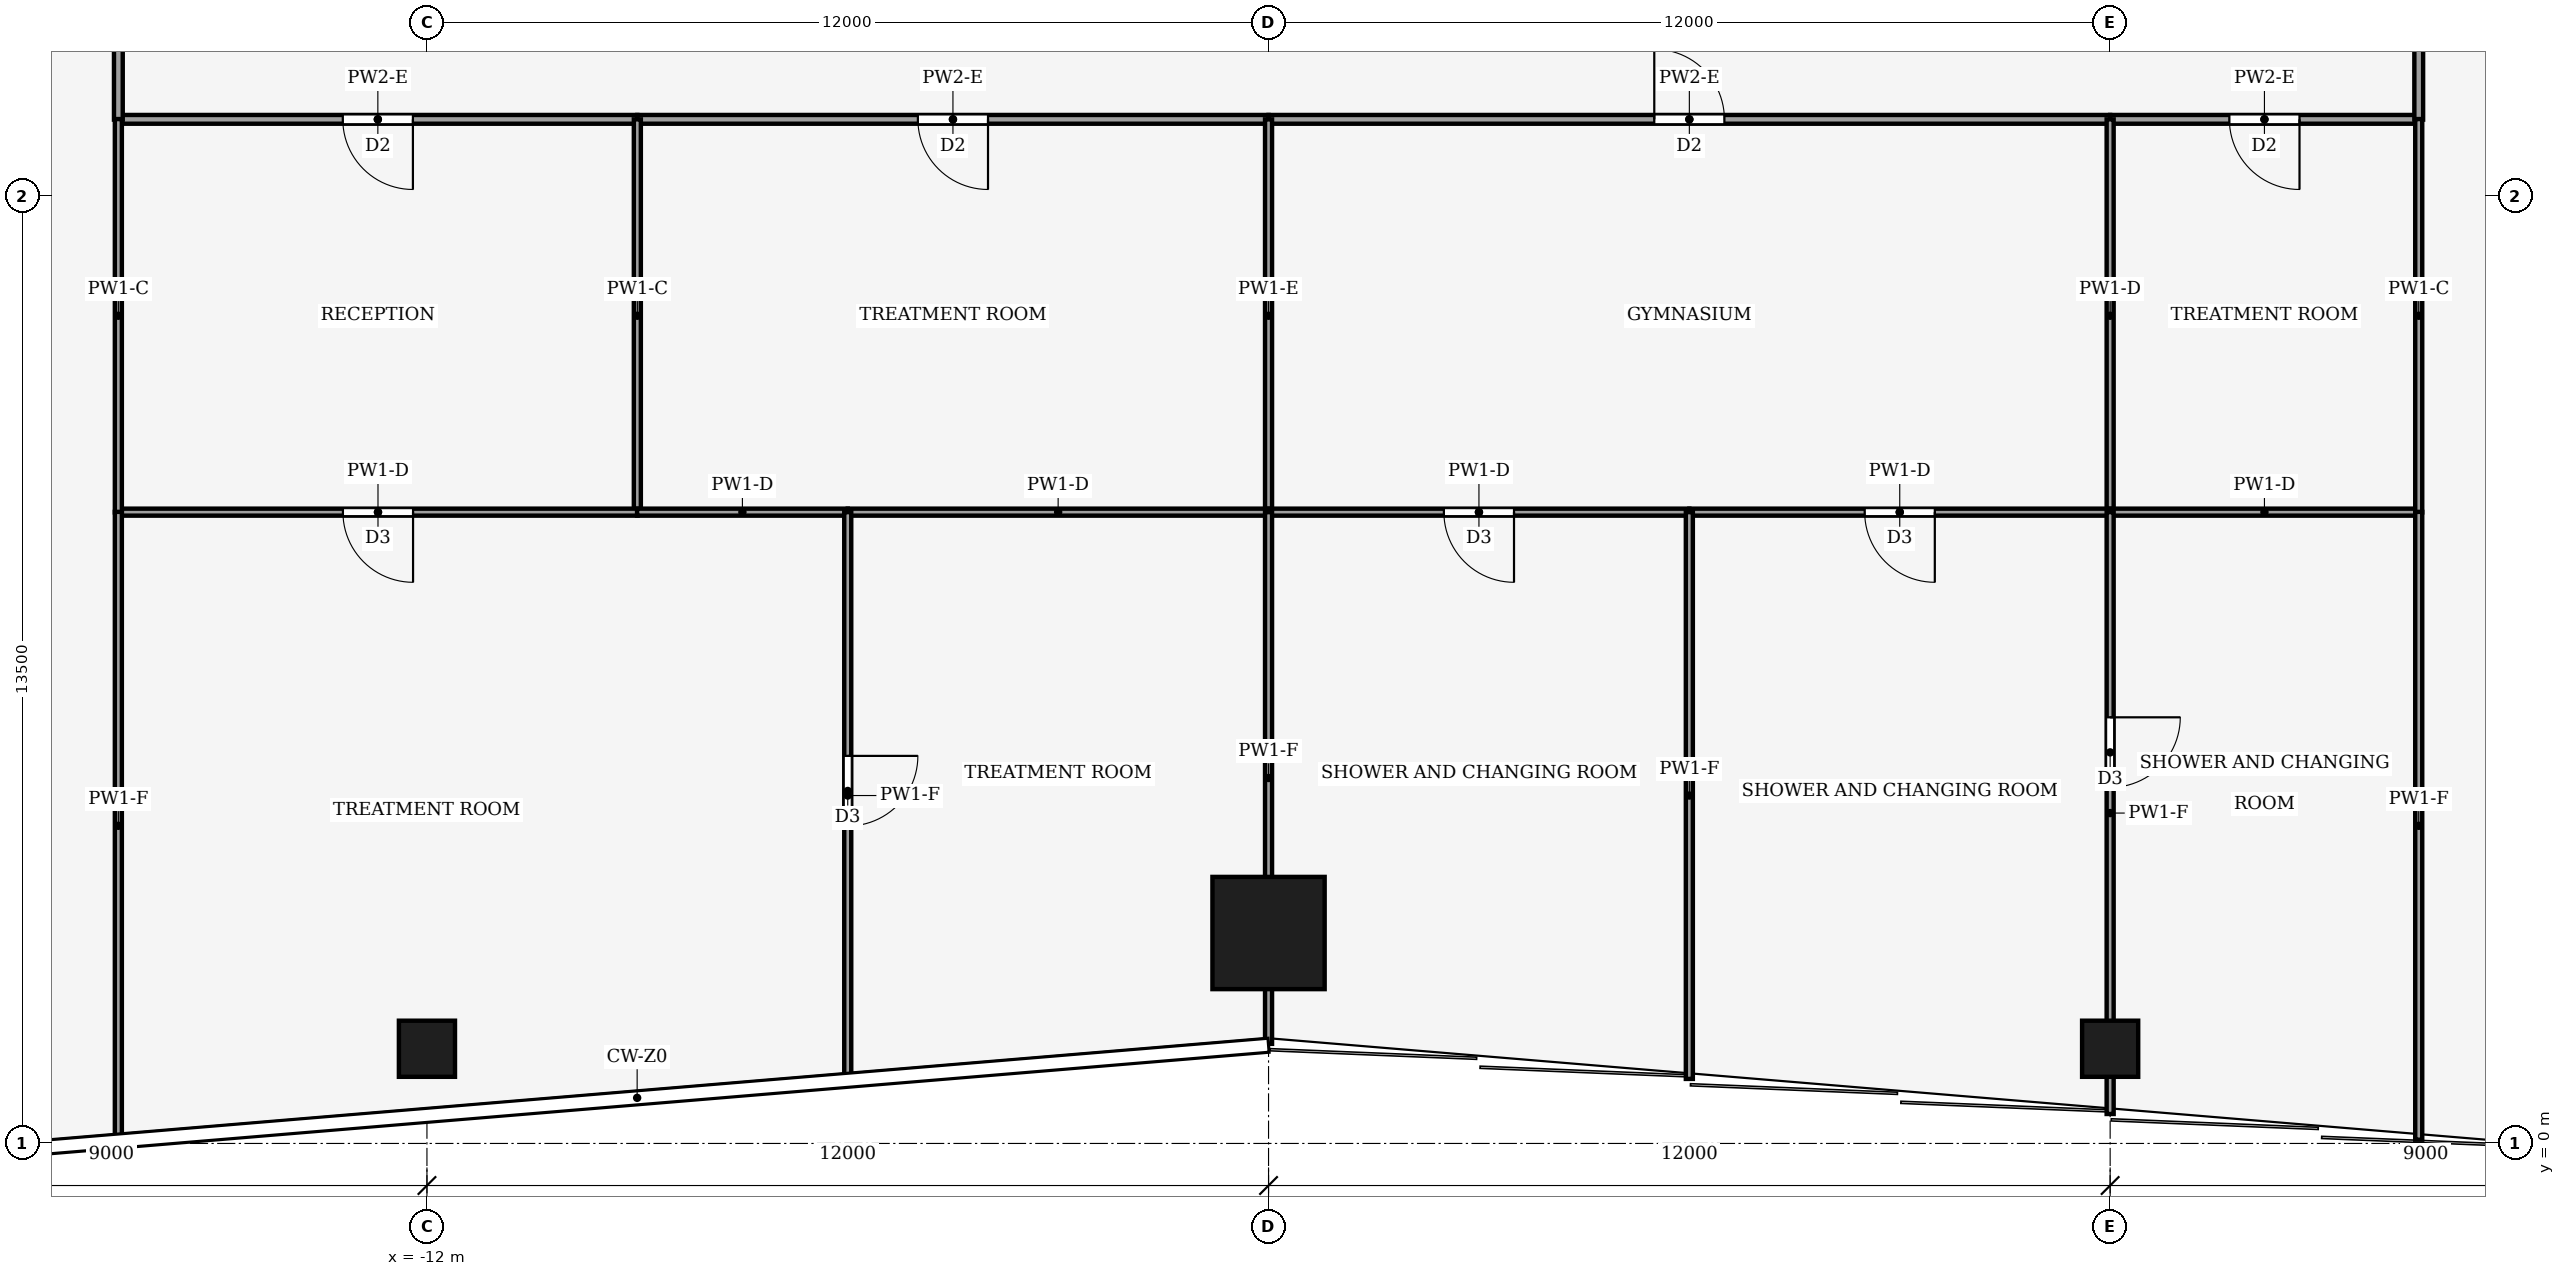
"""IFC4 building model, lengths in metres.
Left out: names, types, materials, properties, quantities, classifications, styles, units other than length and angle.
Written with IfcOpenShell. Run it as: python <this file> out.ifc"""

import sys

from ifc_helpers import new_model, si_unit, direction, frame, frame_2d, origin, origin_2d, place, context, subcontext, project, spatial, rectangle, hollow_rectangle, extrude, element, fill, save


model = new_model("IFC4")
c1 = context("Model", 3, precision=1e-05, world=origin(), true_north=direction((0.0, 1.0)))
c2 = subcontext(c1, "Body", "Model", "MODEL_VIEW")
j1 = project(units=[si_unit("LENGTHUNIT", "METRE"), si_unit("PLANEANGLEUNIT", "RADIAN")], contexts=[c1])
p1 = place(None, origin())
s1 = spatial("IfcSite", under=j1, at=p1, CompositionType="ELEMENT")
p2 = place(p1, origin())
s2 = spatial("IfcBuilding", under=s1, at=p2, CompositionType="ELEMENT")
p3 = place(p2, frame((0.0, 0.0, 18.0)))
s3 = spatial("IfcBuildingStorey", under=s2, at=p3, CompositionType="ELEMENT", Elevation=18.0)
p4 = place(p3, frame((0.0, 3.0, 0.0), z_axis=(0.0, 0.0, 1.0), x_axis=(1.0, 0.0, 0.0)))
e1 = element("IfcColumn", 1, at=p4, inside=s3, PredefinedType="COLUMN", context=c2, shape_type="SweptSolid", body=[
    extrude(hollow_rectangle(XDim=1.6, YDim=1.6, WallThickness=0.09, at=origin_2d()), origin(), (0.0, 0.0, 1.0), 4.0),
])
for number, where, z_axis, x_axis in (
    (2, (-12.0, 1.35, 0.0), (0.0, 0.0, 1.0), (1.0, 0.0, 0.0)),
    (3, (12.0, 1.35, 0.0), (0.0, 0.0, 1.0), (1.0, 0.0, 0.0)),
):
    element("IfcColumn", number, at=place(p3, frame(where, z_axis=z_axis, x_axis=x_axis)), inside=s3, PredefinedType="COLUMN", context=c2, shape_type="SweptSolid", body=[
        extrude(hollow_rectangle(XDim=0.8, YDim=0.8, WallThickness=0.04, at=origin_2d()), origin(), (0.0, 0.0, 1.0), 4.0),
    ])
p5 = place(p3, frame((-9.0, 14.6, 0.0), z_axis=(0.0, 0.0, 1.0), x_axis=(-1.0, 0.0, 0.0)))
e4 = element("IfcWall", 4, at=p5, inside=s3, PredefinedType="PARTITIONING", context=c2, shape_type="SweptSolid", body=[
    extrude(rectangle(XDim=7.4, YDim=0.125, at=frame_2d((3.7, 0.0))), origin(), (0.0, 0.0, 1.0), 3.29),
])
p6 = place(p5, frame((3.2, 0.0, 0.0)))
e5 = element("IfcOpeningElement", 5, at=p6, cuts=e4, PredefinedType="OPENING", context=c2, shape_type="SweptSolid", body=[
    extrude(rectangle(XDim=1.0, YDim=2.1, at=frame_2d((0.5, 1.05))), frame((0.0, 0.073, 0.0), z_axis=(0.0, -1.0, 0.0), x_axis=(1.0, 0.0, 0.0)), (0.0, 0.0, 1.0), 0.145),
])
p7 = place(p3, frame((0.0, 14.6, 0.0), z_axis=(0.0, 0.0, 1.0), x_axis=(-1.0, 0.0, 0.0)))
e6 = element("IfcWall", 6, at=p7, inside=s3, PredefinedType="PARTITIONING", context=c2, shape_type="SweptSolid", body=[
    extrude(rectangle(XDim=9.0, YDim=0.125, at=frame_2d((4.5, 0.0))), origin(), (0.0, 0.0, 1.0), 3.29),
])
p8 = place(p7, frame((4.0, 0.0, 0.0)))
e7 = element("IfcOpeningElement", 7, at=p8, cuts=e6, PredefinedType="OPENING", context=c2, shape_type="SweptSolid", body=[
    extrude(rectangle(XDim=1.0, YDim=2.1, at=frame_2d((0.5, 1.05))), frame((0.0, 0.073, 0.0), z_axis=(0.0, -1.0, 0.0), x_axis=(1.0, 0.0, 0.0)), (0.0, 0.0, 1.0), 0.145),
])
p9 = place(p3, frame((0.0, 14.6, 0.0), z_axis=(0.0, 0.0, 1.0), x_axis=(1.0, 0.0, 0.0)))
e8 = element("IfcWall", 8, at=p9, inside=s3, PredefinedType="PARTITIONING", context=c2, shape_type="SweptSolid", body=[
    extrude(rectangle(XDim=12.0, YDim=0.125, at=frame_2d((6.0, 0.0))), origin(), (0.0, 0.0, 1.0), 3.29),
])
p10 = place(p9, frame((5.5, 0.0, 0.0)))
e9 = element("IfcOpeningElement", 9, at=p10, cuts=e8, PredefinedType="OPENING", context=c2, shape_type="SweptSolid", body=[
    extrude(rectangle(XDim=1.0, YDim=2.1, at=frame_2d((0.5, 1.05))), frame((0.0, 0.073, 0.0), z_axis=(0.0, -1.0, 0.0), x_axis=(1.0, 0.0, 0.0)), (0.0, 0.0, 1.0), 0.145),
])
p11 = place(p3, frame((16.4, 14.6, 0.0), z_axis=(0.0, 0.0, 1.0), x_axis=(-1.0, 0.0, 0.0)))
e10 = element("IfcWall", 10, at=p11, inside=s3, PredefinedType="PARTITIONING", context=c2, shape_type="SweptSolid", body=[
    extrude(rectangle(XDim=4.4, YDim=0.125, at=frame_2d((2.2, 0.0))), origin(), (0.0, 0.0, 1.0), 3.29),
])
p12 = place(p11, frame((1.7, 0.0, 0.0)))
e11 = element("IfcOpeningElement", 11, at=p12, cuts=e10, PredefinedType="OPENING", context=c2, shape_type="SweptSolid", body=[
    extrude(rectangle(XDim=1.0, YDim=2.1, at=frame_2d((0.5, 1.05))), frame((0.0, 0.073, 0.0), z_axis=(0.0, -1.0, 0.0), x_axis=(1.0, 0.0, 0.0)), (0.0, 0.0, 1.0), 0.145),
])
p13 = place(p3, frame((-16.4, 14.596, 0.0), z_axis=(0.0, 0.0, 1.0), x_axis=(0.0, 1.0, 0.0)))
e12 = element("IfcWall", 12, at=p13, inside=s3, PredefinedType="PARTITIONING", context=c2, shape_type="SweptSolid", body=[
    extrude(rectangle(XDim=6.404, YDim=0.125, at=frame_2d((3.202, 0.0))), origin(), (0.0, 0.0, 1.0), 3.14),
])
p14 = place(p13, frame((2.702, 0.0, 0.0)))
e13 = element("IfcOpeningElement", 13, at=p14, cuts=e12, PredefinedType="OPENING", context=c2, shape_type="SweptSolid", body=[
    extrude(rectangle(XDim=1.0, YDim=2.1, at=frame_2d((0.5, 1.05))), frame((0.0, 0.073, 0.0), z_axis=(0.0, -1.0, 0.0), x_axis=(1.0, 0.0, 0.0)), (0.0, 0.0, 1.0), 0.145),
])
p15 = place(p3, frame((16.4, 21.0, 0.0), z_axis=(0.0, 0.0, 1.0), x_axis=(0.0, -1.0, 0.0)))
e14 = element("IfcWall", 14, at=p15, inside=s3, PredefinedType="PARTITIONING", context=c2, shape_type="SweptSolid", body=[
    extrude(rectangle(XDim=6.404, YDim=0.125, at=frame_2d((3.202, 0.0))), origin(), (0.0, 0.0, 1.0), 3.14),
])
p16 = place(p15, frame((2.702, 0.0, 0.0)))
e15 = element("IfcOpeningElement", 15, at=p16, cuts=e14, PredefinedType="OPENING", context=c2, shape_type="SweptSolid", body=[
    extrude(rectangle(XDim=1.0, YDim=2.1, at=frame_2d((0.5, 1.05))), frame((0.0, 0.073, 0.0), z_axis=(0.0, -1.0, 0.0), x_axis=(1.0, 0.0, 0.0)), (0.0, 0.0, 1.0), 0.145),
])
p17 = place(p3, frame((-9.0, 9.0, 0.0), z_axis=(0.0, 0.0, 1.0), x_axis=(0.0, 1.0, 0.0)))
e16 = element("IfcWall", 16, at=p17, inside=s3, PredefinedType="PARTITIONING", context=c2, shape_type="SweptSolid", body=[
    extrude(rectangle(XDim=5.6, YDim=0.1, at=frame_2d((2.8, 0.0))), origin(), (0.0, 0.0, 1.0), 3.87),
])
p18 = place(p3, frame((-8.996, 9.0, 0.0), z_axis=(0.0, 0.0, 1.0), x_axis=(-1.0, 0.0, 0.0)))
e17 = element("IfcWall", 17, at=p18, inside=s3, PredefinedType="PARTITIONING", context=c2, shape_type="SweptSolid", body=[
    extrude(rectangle(XDim=7.404, YDim=0.1, at=frame_2d((3.702, 0.0))), origin(), (0.0, 0.0, 1.0), 3.29),
])
p19 = place(p18, frame((3.202, 0.0, 0.0)))
e18 = element("IfcOpeningElement", 18, at=p19, cuts=e17, PredefinedType="OPENING", context=c2, shape_type="SweptSolid", body=[
    extrude(rectangle(XDim=1.0, YDim=2.1, at=frame_2d((0.5, 1.05))), frame((0.0, 0.06, 0.0), z_axis=(0.0, -1.0, 0.0), x_axis=(1.0, 0.0, 0.0)), (0.0, 0.0, 1.0), 0.12),
])
p20 = place(p3, frame((-16.4, 14.604, 0.0), z_axis=(0.0, 0.0, 1.0), x_axis=(0.0, -1.0, 0.0)))
e19 = element("IfcWall", 19, at=p20, inside=s3, PredefinedType="PARTITIONING", context=c2, shape_type="SweptSolid", body=[
    extrude(rectangle(XDim=5.608, YDim=0.1, at=frame_2d((2.804, 0.0))), origin(), (0.0, 0.0, 1.0), 3.87),
])
p21 = place(p3, frame((0.0, 9.0, 0.0), z_axis=(0.0, 0.0, 1.0), x_axis=(0.0, 1.0, 0.0)))
e20 = element("IfcWall", 20, at=p21, inside=s3, PredefinedType="PARTITIONING", context=c2, shape_type="SweptSolid", body=[
    extrude(rectangle(XDim=5.6, YDim=0.1, at=frame_2d((2.8, 0.0))), origin(), (0.0, 0.0, 1.0), 3.34),
])
p22 = place(p3, frame((-9.004, 9.0, 0.0), z_axis=(0.0, 0.0, 1.0), x_axis=(1.0, 0.0, 0.0)))
e21 = element("IfcWall", 21, at=p22, inside=s3, PredefinedType="PARTITIONING", context=c2, shape_type="SweptSolid", body=[
    extrude(rectangle(XDim=3.004, YDim=0.1, at=frame_2d((1.502, 0.0))), origin(), (0.0, 0.0, 1.0), 3.29),
])
p23 = place(p3, frame((-6.0, 9.0, 0.0), z_axis=(0.0, 0.0, 1.0), x_axis=(1.0, 0.0, 0.0)))
e22 = element("IfcWall", 22, at=p23, inside=s3, PredefinedType="PARTITIONING", context=c2, shape_type="SweptSolid", body=[
    extrude(rectangle(XDim=6.0, YDim=0.1, at=frame_2d((3.0, 0.0))), origin(), (0.0, 0.0, 1.0), 3.29),
])
p24 = place(p3, frame((12.0, 9.0, 0.0), z_axis=(0.0, 0.0, 1.0), x_axis=(0.0, 1.0, 0.0)))
e23 = element("IfcWall", 23, at=p24, inside=s3, PredefinedType="PARTITIONING", context=c2, shape_type="SweptSolid", body=[
    extrude(rectangle(XDim=5.6, YDim=0.1, at=frame_2d((2.8, 0.0))), origin(), (0.0, 0.0, 1.0), 3.29),
])
p25 = place(p3, frame((6.0, 9.0, 0.0), z_axis=(0.0, 0.0, 1.0), x_axis=(-1.0, 0.0, 0.0)))
e24 = element("IfcWall", 24, at=p25, inside=s3, PredefinedType="PARTITIONING", context=c2, shape_type="SweptSolid", body=[
    extrude(rectangle(XDim=6.0, YDim=0.1, at=frame_2d((3.0, 0.0))), origin(), (0.0, 0.0, 1.0), 3.29),
])
p26 = place(p25, frame((2.5, 0.0, 0.0)))
e25 = element("IfcOpeningElement", 25, at=p26, cuts=e24, PredefinedType="OPENING", context=c2, shape_type="SweptSolid", body=[
    extrude(rectangle(XDim=1.0, YDim=2.1, at=frame_2d((0.5, 1.05))), frame((0.0, 0.06, 0.0), z_axis=(0.0, -1.0, 0.0), x_axis=(1.0, 0.0, 0.0)), (0.0, 0.0, 1.0), 0.12),
])
p27 = place(p3, frame((12.0, 9.0, 0.0), z_axis=(0.0, 0.0, 1.0), x_axis=(-1.0, 0.0, 0.0)))
e26 = element("IfcWall", 26, at=p27, inside=s3, PredefinedType="PARTITIONING", context=c2, shape_type="SweptSolid", body=[
    extrude(rectangle(XDim=6.0, YDim=0.1, at=frame_2d((3.0, 0.0))), origin(), (0.0, 0.0, 1.0), 3.29),
])
p28 = place(p27, frame((2.5, 0.0, 0.0)))
e27 = element("IfcOpeningElement", 27, at=p28, cuts=e26, PredefinedType="OPENING", context=c2, shape_type="SweptSolid", body=[
    extrude(rectangle(XDim=1.0, YDim=2.1, at=frame_2d((0.5, 1.05))), frame((0.0, 0.06, 0.0), z_axis=(0.0, -1.0, 0.0), x_axis=(1.0, 0.0, 0.0)), (0.0, 0.0, 1.0), 0.12),
])
p29 = place(p3, frame((12.0, 9.0, 0.0), z_axis=(0.0, 0.0, 1.0), x_axis=(1.0, 0.0, 0.0)))
e28 = element("IfcWall", 28, at=p29, inside=s3, PredefinedType="PARTITIONING", context=c2, shape_type="SweptSolid", body=[
    extrude(rectangle(XDim=4.4, YDim=0.1, at=frame_2d((2.2, 0.0))), origin(), (0.0, 0.0, 1.0), 3.29),
])
p30 = place(p3, frame((16.4, 8.996, 0.0), z_axis=(0.0, 0.0, 1.0), x_axis=(0.0, 1.0, 0.0)))
e29 = element("IfcWall", 29, at=p30, inside=s3, PredefinedType="PARTITIONING", context=c2, shape_type="SweptSolid", body=[
    extrude(rectangle(XDim=5.608, YDim=0.1, at=frame_2d((2.804, 0.0))), origin(), (0.0, 0.0, 1.0), 3.87),
])
p31 = place(p3, frame((-6.0, 9.0, 0.0), z_axis=(0.0, 0.0, 1.0), x_axis=(0.0, -1.0, 0.0)))
e30 = element("IfcWall", 30, at=p31, inside=s3, PredefinedType="PARTITIONING", context=c2, shape_type="SweptSolid", body=[
    extrude(rectangle(XDim=8.08, YDim=0.1, at=frame_2d((4.04, 0.0))), origin(), (0.0, 0.0, 1.0), 3.04),
])
p32 = place(p31, frame((3.475, 0.0, 0.0)))
e31 = element("IfcOpeningElement", 31, at=p32, cuts=e30, PredefinedType="OPENING", context=c2, shape_type="SweptSolid", body=[
    extrude(rectangle(XDim=1.0, YDim=2.1, at=frame_2d((0.5, 1.05))), frame((0.0, 0.06, 0.0), z_axis=(0.0, -1.0, 0.0), x_axis=(1.0, 0.0, 0.0)), (0.0, 0.0, 1.0), 0.12),
])
p33 = place(p3, frame((-16.4, 9.004, 0.0), z_axis=(0.0, 0.0, 1.0), x_axis=(0.0, -1.0, 0.0)))
e32 = element("IfcWall", 32, at=p33, inside=s3, PredefinedType="PARTITIONING", context=c2, shape_type="SweptSolid", body=[
    extrude(rectangle(XDim=8.951, YDim=0.1, at=frame_2d((4.475, 0.0))), origin(), (0.0, 0.0, 1.0), 3.04),
])
p34 = place(p3, frame((0.0, 1.42, 0.0), z_axis=(0.0, 0.0, 1.0), x_axis=(0.0, 1.0, 0.0)))
e33 = element("IfcWall", 33, at=p34, inside=s3, PredefinedType="PARTITIONING", context=c2, shape_type="SweptSolid", body=[
    extrude(rectangle(XDim=7.58, YDim=0.1, at=frame_2d((3.79, 0.0))), origin(), (0.0, 0.0, 1.0), 3.04),
])
p35 = place(p3, frame((6.0, 0.92, 0.0), z_axis=(0.0, 0.0, 1.0), x_axis=(0.0, 1.0, 0.0)))
e34 = element("IfcWall", 34, at=p35, inside=s3, PredefinedType="PARTITIONING", context=c2, shape_type="SweptSolid", body=[
    extrude(rectangle(XDim=8.08, YDim=0.1, at=frame_2d((4.04, 0.0))), origin(), (0.0, 0.0, 1.0), 3.04),
])
p36 = place(p3, frame((12.0, 9.0, 0.0), z_axis=(0.0, 0.0, 1.0), x_axis=(0.0, -1.0, 0.0)))
e35 = element("IfcWall", 35, at=p36, inside=s3, PredefinedType="PARTITIONING", context=c2, shape_type="SweptSolid", body=[
    extrude(rectangle(XDim=8.58, YDim=0.1, at=frame_2d((4.29, 0.0))), origin(), (0.0, 0.0, 1.0), 3.04),
])
p37 = place(p36, frame((2.925, 0.0, 0.0)))
e36 = element("IfcOpeningElement", 36, at=p37, cuts=e35, PredefinedType="OPENING", context=c2, shape_type="SweptSolid", body=[
    extrude(rectangle(XDim=1.0, YDim=2.1, at=frame_2d((0.5, 1.05))), frame((0.0, 0.06, 0.0), z_axis=(0.0, -1.0, 0.0), x_axis=(1.0, 0.0, 0.0)), (0.0, 0.0, 1.0), 0.12),
])
p38 = place(p3, frame((16.4, 0.053, 0.0), z_axis=(0.0, 0.0, 1.0), x_axis=(0.0, 1.0, 0.0)))
e37 = element("IfcWall", 37, at=p38, inside=s3, PredefinedType="PARTITIONING", context=c2, shape_type="SweptSolid", body=[
    extrude(rectangle(XDim=8.951, YDim=0.1, at=frame_2d((4.475, 0.0))), origin(), (0.0, 0.0, 1.0), 3.04),
])
p39 = place(p6, origin())
e38 = element("IfcDoor", 38, at=p39, inside=s3, OperationType="SINGLE_SWING_LEFT", PredefinedType="DOOR", context=c2, shape_type="SweptSolid", body=[
    extrude(rectangle(XDim=1.0, YDim=2.1, at=frame_2d((0.5, 1.05))), frame((0.0, 0.025, 0.0), z_axis=(0.0, -1.0, 0.0), x_axis=(1.0, 0.0, 0.0)), (0.0, 0.0, 1.0), 0.05),
])
fill(e5, e38)
p40 = place(p8, origin())
e39 = element("IfcDoor", 39, at=p40, inside=s3, OperationType="SINGLE_SWING_RIGHT", PredefinedType="DOOR", context=c2, shape_type="SweptSolid", body=[
    extrude(rectangle(XDim=1.0, YDim=2.1, at=frame_2d((0.5, 1.05))), frame((0.0, 0.025, 0.0), z_axis=(0.0, -1.0, 0.0), x_axis=(1.0, 0.0, 0.0)), (0.0, 0.0, 1.0), 0.05),
])
fill(e7, e39)
p41 = place(p10, origin())
e40 = element("IfcDoor", 40, at=p41, inside=s3, OperationType="SINGLE_SWING_LEFT", PredefinedType="DOOR", context=c2, shape_type="SweptSolid", body=[
    extrude(rectangle(XDim=1.0, YDim=2.1, at=frame_2d((0.5, 1.05))), frame((0.0, 0.025, 0.0), z_axis=(0.0, -1.0, 0.0), x_axis=(1.0, 0.0, 0.0)), (0.0, 0.0, 1.0), 0.05),
])
fill(e9, e40)
p42 = place(p12, origin())
e41 = element("IfcDoor", 41, at=p42, inside=s3, OperationType="SINGLE_SWING_RIGHT", PredefinedType="DOOR", context=c2, shape_type="SweptSolid", body=[
    extrude(rectangle(XDim=1.0, YDim=2.1, at=frame_2d((0.5, 1.05))), frame((0.0, 0.025, 0.0), z_axis=(0.0, -1.0, 0.0), x_axis=(1.0, 0.0, 0.0)), (0.0, 0.0, 1.0), 0.05),
])
fill(e11, e41)
p43 = place(p19, origin())
e42 = element("IfcDoor", 42, at=p43, inside=s3, OperationType="SINGLE_SWING_LEFT", PredefinedType="DOOR", context=c2, shape_type="SweptSolid", body=[
    extrude(rectangle(XDim=1.0, YDim=2.1, at=frame_2d((0.5, 1.05))), frame((0.0, 0.025, 0.0), z_axis=(0.0, -1.0, 0.0), x_axis=(1.0, 0.0, 0.0)), (0.0, 0.0, 1.0), 0.05),
])
fill(e18, e42)
p44 = place(p26, origin())
e43 = element("IfcDoor", 43, at=p44, inside=s3, OperationType="SINGLE_SWING_RIGHT", PredefinedType="DOOR", context=c2, shape_type="SweptSolid", body=[
    extrude(rectangle(XDim=1.0, YDim=2.1, at=frame_2d((0.5, 1.05))), frame((0.0, 0.025, 0.0), z_axis=(0.0, -1.0, 0.0), x_axis=(1.0, 0.0, 0.0)), (0.0, 0.0, 1.0), 0.05),
])
fill(e25, e43)
p45 = place(p28, origin())
e44 = element("IfcDoor", 44, at=p45, inside=s3, OperationType="SINGLE_SWING_LEFT", PredefinedType="DOOR", context=c2, shape_type="SweptSolid", body=[
    extrude(rectangle(XDim=1.0, YDim=2.1, at=frame_2d((0.5, 1.05))), frame((0.0, 0.025, 0.0), z_axis=(0.0, -1.0, 0.0), x_axis=(1.0, 0.0, 0.0)), (0.0, 0.0, 1.0), 0.05),
])
fill(e27, e44)
p46 = place(p32, origin())
e45 = element("IfcDoor", 45, at=p46, inside=s3, OperationType="SINGLE_SWING_LEFT", PredefinedType="DOOR", context=c2, shape_type="SweptSolid", body=[
    extrude(rectangle(XDim=1.0, YDim=2.1, at=frame_2d((0.5, 1.05))), frame((0.0, 0.025, 0.0), z_axis=(0.0, -1.0, 0.0), x_axis=(1.0, 0.0, 0.0)), (0.0, 0.0, 1.0), 0.05),
])
fill(e31, e45)
p47 = place(p37, origin())
e46 = element("IfcDoor", 46, at=p47, inside=s3, OperationType="SINGLE_SWING_LEFT", PredefinedType="DOOR", context=c2, shape_type="SweptSolid", body=[
    extrude(rectangle(XDim=1.0, YDim=2.1, at=frame_2d((0.5, 1.05))), frame((0.0, 0.025, 0.0), z_axis=(0.0, -1.0, 0.0), x_axis=(1.0, 0.0, 0.0)), (0.0, 0.0, 1.0), 0.05),
])
fill(e36, e46)
save(model, sys.argv[1])
